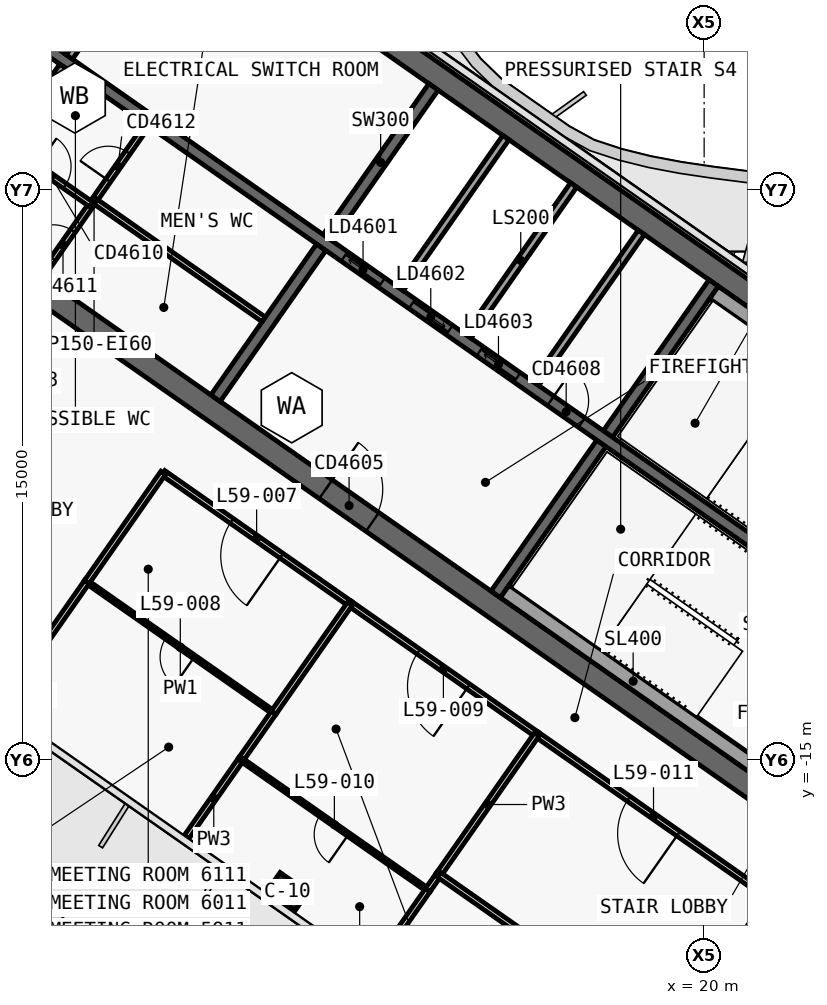
"""IFC4 building model, lengths in metres.
Left out: names, types, materials, properties, quantities, classifications, styles, units other than length and angle.
Written with IfcOpenShell. Run it as: python <this file> out.ifc"""

import sys

from ifc_helpers import new_model, si_unit, direction, frame, frame_2d, origin, origin_2d, place, context, subcontext, project, spatial, polyline, rectangle, outline, extrude, element, fill, save


model = new_model("IFC4")
c1 = context("Model", 3, precision=1e-05, world=origin(), true_north=direction((0.0, 1.0)))
c2 = subcontext(c1, "Body", "Model", "MODEL_VIEW")
j1 = project(units=[si_unit("LENGTHUNIT", "METRE"), si_unit("PLANEANGLEUNIT", "RADIAN")], contexts=[c1])
p1 = place(None, origin())
s1 = spatial("IfcSite", under=j1, at=p1, CompositionType="ELEMENT")
p2 = place(p1, origin())
s2 = spatial("IfcBuilding", under=s1, at=p2, CompositionType="ELEMENT")
p3 = place(p2, frame((0.0, 0.0, 252.7)))
s3 = spatial("IfcBuildingStorey", under=s2, at=p3, CompositionType="ELEMENT", Elevation=252.7)
p4 = place(p3, frame((0.028, 12.066, 0.0), z_axis=(0.0, 0.0, 1.0), x_axis=(0.819151382952, -0.573577380837, 0.0)))
e1 = element("IfcWall", 1, at=p4, inside=s3, PredefinedType="SHEAR", context=c2, shape_type="SweptSolid", body=[
    extrude(outline(polyline([(33.898, 0.3), (0.0, 0.3), (0.42, -0.3), (33.898, -0.3), (33.898, 0.3)])), origin(), (0.0, 0.0, 1.0), 3.9),
])
p5 = place(p3, frame((0.028, -0.874, 0.0), z_axis=(0.0, 0.0, 1.0), x_axis=(0.819150035022, -0.573579305871, 0.0)))
e2 = element("IfcWall", 2, at=p5, inside=s3, PredefinedType="SHEAR", context=c2, shape_type="SweptSolid", body=[
    extrude(outline(polyline([(26.476, 0.3), (0.0, 0.3), (0.42, -0.3), (26.476, -0.3), (26.476, 0.3)])), origin(), (0.0, 0.0, 1.0), 3.9),
])
p6 = place(p5, frame((0.826, 0.0, 0.0)))
e3 = element("IfcOpeningElement", 3, at=p6, cuts=e2, PredefinedType="OPENING", context=c2, shape_type="SweptSolid", body=[
    extrude(rectangle(XDim=1.5, YDim=2.1, at=frame_2d((0.75, 1.05))), frame((0.0, 0.31, 0.0), z_axis=(0.0, -1.0, 0.0), x_axis=(1.0, 0.0, 0.0)), (0.0, 0.0, 1.0), 0.62),
])
p7 = place(p5, frame((12.226, 0.0, 0.0)))
e4 = element("IfcOpeningElement", 4, at=p7, cuts=e2, PredefinedType="OPENING", context=c2, shape_type="SweptSolid", body=[
    extrude(rectangle(XDim=1.5, YDim=2.1, at=frame_2d((0.75, 1.05))), frame((0.0, 0.31, 0.0), z_axis=(0.0, -1.0, 0.0), x_axis=(1.0, 0.0, 0.0)), (0.0, 0.0, 1.0), 0.62),
])
p8 = place(p3, frame((7.143, -5.49, 0.0), z_axis=(0.0, 0.0, 1.0), x_axis=(0.573617744349, 0.819123118565, 0.0)))
e5 = element("IfcWall", 5, at=p8, inside=s3, PredefinedType="SHEAR", context=c2, shape_type="SweptSolid", body=[
    extrude(outline(polyline([(0.0, 0.15), (0.0, -0.15), (4.85, -0.15), (4.85, 0.15), (0.0, 0.15)])), origin(), (0.0, 0.0, 1.0), 3.9),
])
p9 = place(p3, frame((10.097, -1.271, 0.0), z_axis=(0.0, 0.0, 1.0), x_axis=(0.573560315113, 0.819163332265, 0.0)))
e6 = element("IfcWall", 6, at=p9, inside=s3, PredefinedType="SHEAR", context=c2, shape_type="SweptSolid", body=[
    extrude(outline(polyline([(4.85, -0.15), (4.85, 0.15), (0.0, 0.15), (0.0, -0.15), (4.85, -0.15)])), origin(), (0.0, 0.0, 1.0), 3.9),
])
p10 = place(p3, frame((14.515, -10.652, 0.0), z_axis=(0.0, 0.0, 1.0), x_axis=(0.573560315113, 0.819163332265, 0.0)))
e7 = element("IfcWall", 7, at=p10, inside=s3, PredefinedType="SHEAR", context=c2, shape_type="SweptSolid", body=[
    extrude(outline(polyline([(0.0, 0.15), (0.0, -0.15), (4.85, -0.15), (4.85, 0.15), (0.0, 0.15)])), origin(), (0.0, 0.0, 1.0), 3.9),
])
p11 = place(p3, frame((17.469, -6.433, 0.0), z_axis=(0.0, 0.0, 1.0), x_axis=(0.573594092424, 0.81913968109, 0.0)))
e8 = element("IfcWall", 8, at=p11, inside=s3, PredefinedType="SHEAR", context=c2, shape_type="SweptSolid", body=[
    extrude(outline(polyline([(4.85, -0.15), (4.85, 0.15), (0.0, 0.15), (0.0, -0.15), (4.85, -0.15)])), origin(), (0.0, 0.0, 1.0), 3.9),
])
p12 = place(p3, frame((2.638, 3.768, 0.0), z_axis=(0.0, 0.0, 1.0), x_axis=(0.819155014212, -0.573572194837, 0.0)))
e9 = element("IfcWall", 9, at=p12, inside=s3, PredefinedType="SHEAR", context=c2, shape_type="SweptSolid", body=[
    extrude(outline(polyline([(0.0, 0.15), (0.0, -0.15), (26.4, -0.15), (26.4, 0.15), (0.0, 0.15)])), origin(), (0.0, 0.0, 1.0), 3.9),
])
p13 = place(p12, frame((9.637, 0.0, 0.0)))
e10 = element("IfcOpeningElement", 10, at=p13, cuts=e9, PredefinedType="OPENING", context=c2, shape_type="SweptSolid", body=[
    extrude(rectangle(XDim=1.2, YDim=2.1, at=frame_2d((0.6, 1.05))), frame((0.0, 0.16, 0.0), z_axis=(0.0, -1.0, 0.0), x_axis=(1.0, 0.0, 0.0)), (0.0, 0.0, 1.0), 0.32),
])
p14 = place(p12, frame((11.812, 0.0, 0.0)))
e11 = element("IfcOpeningElement", 11, at=p14, cuts=e9, PredefinedType="OPENING", context=c2, shape_type="SweptSolid", body=[
    extrude(rectangle(XDim=1.2, YDim=2.1, at=frame_2d((0.6, 1.05))), frame((0.0, 0.16, 0.0), z_axis=(0.0, -1.0, 0.0), x_axis=(1.0, 0.0, 0.0)), (0.0, 0.0, 1.0), 0.32),
])
p15 = place(p12, frame((13.988, 0.0, 0.0)))
e12 = element("IfcOpeningElement", 12, at=p15, cuts=e9, PredefinedType="OPENING", context=c2, shape_type="SweptSolid", body=[
    extrude(rectangle(XDim=1.2, YDim=2.1, at=frame_2d((0.6, 1.05))), frame((0.0, 0.16, 0.0), z_axis=(0.0, -1.0, 0.0), x_axis=(1.0, 0.0, 0.0)), (0.0, 0.0, 1.0), 0.32),
])
p16 = place(p12, frame((16.262, 0.0, 0.0)))
e13 = element("IfcOpeningElement", 13, at=p16, cuts=e9, PredefinedType="OPENING", context=c2, shape_type="SweptSolid", body=[
    extrude(rectangle(XDim=1.0, YDim=2.1, at=frame_2d((0.5, 1.05))), frame((0.0, 0.16, 0.0), z_axis=(0.0, -1.0, 0.0), x_axis=(1.0, 0.0, 0.0)), (0.0, 0.0, 1.0), 0.32),
])
p17 = place(p3, frame((9.038, -18.475, 0.0), z_axis=(0.0, 0.0, 1.0), x_axis=(0.819152044289, -0.573576436351, 0.0)))
e14 = element("IfcColumn", 14, at=p17, inside=s3, PredefinedType="COLUMN", context=c2, shape_type="SweptSolid", body=[
    extrude(rectangle(XDim=0.9, YDim=0.6, at=origin_2d()), origin(), (0.0, 0.0, 1.0), 3.9),
])
p18 = place(p3, frame((12.001, -2.605, 0.0), z_axis=(0.0, 0.0, 1.0), x_axis=(0.573560315113, 0.819163332265, 0.0)))
e15 = element("IfcWall", 15, at=p18, inside=s3, PredefinedType="SOLIDWALL", context=c2, shape_type="SweptSolid", body=[
    extrude(rectangle(XDim=4.85, YDim=0.2, at=frame_2d((2.425, 0.0))), origin(), (0.0, 0.0, 1.0), 3.9),
])
p19 = place(p3, frame((13.783, -3.852, 0.0), z_axis=(0.0, 0.0, 1.0), x_axis=(0.573594092424, 0.81913968109, 0.0)))
e16 = element("IfcWall", 16, at=p19, inside=s3, PredefinedType="SOLIDWALL", context=c2, shape_type="SweptSolid", body=[
    extrude(rectangle(XDim=4.85, YDim=0.2, at=frame_2d((2.425, 0.0))), origin(), (0.0, 0.0, 1.0), 3.9),
])
p20 = place(p3, frame((15.565, -5.1, 0.0), z_axis=(0.0, 0.0, 1.0), x_axis=(0.573560315113, 0.819163332265, 0.0)))
e17 = element("IfcWall", 17, at=p20, inside=s3, PredefinedType="SOLIDWALL", context=c2, shape_type="SweptSolid", body=[
    extrude(rectangle(XDim=4.85, YDim=0.2, at=frame_2d((2.425, 0.0))), origin(), (0.0, 0.0, 1.0), 3.9),
])
p21 = place(p3, frame((2.556, -2.278, 0.0), z_axis=(0.0, 0.0, 1.0), x_axis=(0.573560315113, 0.819163332265, 0.0)))
e18 = element("IfcWall", 18, at=p21, inside=s3, PredefinedType="PARTITIONING", context=c2, shape_type="SweptSolid", body=[
    extrude(rectangle(XDim=4.85, YDim=0.15, at=frame_2d((2.425, 0.0))), origin(), (0.0, 0.0, 1.0), 3.62),
])
p22 = place(p21, frame((0.55, 0.0, 0.0)))
e19 = element("IfcOpeningElement", 19, at=p22, cuts=e18, PredefinedType="OPENING", context=c2, shape_type="SweptSolid", body=[
    extrude(rectangle(XDim=0.9, YDim=2.1, at=frame_2d((0.45, 1.05))), frame((0.0, 0.085, 0.0), z_axis=(0.0, -1.0, 0.0), x_axis=(1.0, 0.0, 0.0)), (0.0, 0.0, 1.0), 0.17),
])
p23 = place(p21, frame((3.075, 0.0, 0.0)))
e20 = element("IfcOpeningElement", 20, at=p23, cuts=e18, PredefinedType="OPENING", context=c2, shape_type="SweptSolid", body=[
    extrude(rectangle(XDim=0.9, YDim=2.1, at=frame_2d((0.45, 1.05))), frame((0.0, 0.085, 0.0), z_axis=(0.0, -1.0, 0.0), x_axis=(1.0, 0.0, 0.0)), (0.0, 0.0, 1.0), 0.17),
])
p24 = place(p3, frame((1.745, 1.097, 0.0), z_axis=(0.0, 0.0, 1.0), x_axis=(0.819178980414, -0.573537965655, 0.0)))
e21 = element("IfcWall", 21, at=p24, inside=s3, PredefinedType="PARTITIONING", context=c2, shape_type="SweptSolid", body=[
    extrude(rectangle(XDim=2.6, YDim=0.15, at=frame_2d((1.3, 0.0))), origin(), (0.0, 0.0, 1.0), 3.62),
])
p25 = place(p24, frame((0.85, 0.0, 0.0)))
e22 = element("IfcOpeningElement", 22, at=p25, cuts=e21, PredefinedType="OPENING", context=c2, shape_type="SweptSolid", body=[
    extrude(rectangle(XDim=0.9, YDim=2.1, at=frame_2d((0.45, 1.05))), frame((0.0, 0.085, 0.0), z_axis=(0.0, -1.0, 0.0), x_axis=(1.0, 0.0, 0.0)), (0.0, 0.0, 1.0), 0.17),
])
p26 = place(p3, frame((3.947, -0.292, 0.0), z_axis=(0.0, 0.0, 1.0), x_axis=(0.819151939971, -0.573576585332, 0.0)))
e23 = element("IfcWall", 23, at=p26, inside=s3, PredefinedType="PARTITIONING", context=c2, shape_type="SweptSolid", body=[
    extrude(rectangle(XDim=5.45, YDim=0.15, at=frame_2d((2.725, 0.0))), origin(), (0.0, 0.0, 1.0), 3.62),
])
p27 = place(p3, frame((20.259, -2.71, 0.0), z_axis=(0.0, 0.0, 1.0), x_axis=(0.81914849389, -0.573581506813, 0.0)))
e24 = element("IfcWall", 24, at=p27, inside=s3, PredefinedType="SOLIDWALL", context=c2, shape_type="SweptSolid", body=[
    extrude(rectangle(XDim=8.25, YDim=0.4, at=frame_2d((4.125, 0.0))), origin(), (0.0, 0.0, 1.0), 3.62),
])
p28 = place(p3, frame((14.753, -10.574, 0.0), z_axis=(0.0, 0.0, 1.0), x_axis=(0.819158229677, -0.573567602601, 0.0)))
e25 = element("IfcWall", 25, at=p28, inside=s3, PredefinedType="SOLIDWALL", context=c2, shape_type="SweptSolid", body=[
    extrude(rectangle(XDim=8.25, YDim=0.4, at=frame_2d((4.125, 0.0))), origin(), (0.0, 0.0, 1.0), 3.62),
])
p29 = place(p3, frame((0.344, -0.729, 0.0), z_axis=(0.0, 0.0, 1.0), x_axis=(0.573560315113, 0.819163332265, 0.0)))
e26 = element("IfcWall", 26, at=p29, inside=s3, PredefinedType="SOLIDWALL", context=c2, shape_type="SweptSolid", body=[
    extrude(rectangle(XDim=4.85, YDim=0.2, at=frame_2d((2.425, 0.0))), origin(), (0.0, 0.0, 1.0), 3.62),
])
p30 = place(p29, frame((0.55, 0.0, 0.0)))
e27 = element("IfcOpeningElement", 27, at=p30, cuts=e26, PredefinedType="OPENING", context=c2, shape_type="SweptSolid", body=[
    extrude(rectangle(XDim=0.9, YDim=2.1, at=frame_2d((0.45, 1.05))), frame((0.0, 0.11, 0.0), z_axis=(0.0, -1.0, 0.0), x_axis=(1.0, 0.0, 0.0)), (0.0, 0.0, 1.0), 0.22),
])
p31 = place(p3, frame((3.298, 3.49, 0.0), z_axis=(0.0, 0.0, 1.0), x_axis=(0.573560315113, 0.819163332265, 0.0)))
e28 = element("IfcWall", 28, at=p31, inside=s3, PredefinedType="SOLIDWALL", context=c2, shape_type="SweptSolid", body=[
    extrude(rectangle(XDim=4.85, YDim=0.2, at=frame_2d((2.425, 0.0))), origin(), (0.0, 0.0, 1.0), 3.62),
])
p32 = place(p31, frame((0.7, 0.0, 0.0)))
e29 = element("IfcOpeningElement", 29, at=p32, cuts=e28, PredefinedType="OPENING", context=c2, shape_type="SweptSolid", body=[
    extrude(rectangle(XDim=1.0, YDim=2.1, at=frame_2d((0.5, 1.05))), frame((0.0, 0.11, 0.0), z_axis=(0.0, -1.0, 0.0), x_axis=(1.0, 0.0, 0.0)), (0.0, 0.0, 1.0), 0.22),
])
p33 = place(p3, frame((10.683, -10.898, 0.0), z_axis=(0.0, 0.0, 1.0), x_axis=(-0.819147828287, 0.573582457378, 0.0)))
e30 = element("IfcWall", 30, at=p33, inside=s3, PredefinedType="PARTITIONING", context=c2, shape_type="SweptSolid", body=[
    extrude(rectangle(XDim=6.002, YDim=0.15, at=frame_2d((3.001, 0.0))), origin(), (0.0, 0.0, 1.0), 3.05),
])
p34 = place(p33, frame((2.201, 0.0, 0.0)))
e31 = element("IfcOpeningElement", 31, at=p34, cuts=e30, PredefinedType="OPENING", context=c2, shape_type="SweptSolid", body=[
    extrude(rectangle(XDim=1.6, YDim=2.1, at=frame_2d((0.8, 1.05))), frame((0.0, 0.085, 0.0), z_axis=(0.0, -1.0, 0.0), x_axis=(1.0, 0.0, 0.0)), (0.0, 0.0, 1.0), 0.17),
])
p35 = place(p3, frame((15.598, -14.34, 0.0), z_axis=(0.0, 0.0, 1.0), x_axis=(-0.819145946981, 0.573585144111, 0.0)))
e32 = element("IfcWall", 32, at=p35, inside=s3, PredefinedType="PARTITIONING", context=c2, shape_type="SweptSolid", body=[
    extrude(rectangle(XDim=6.004, YDim=0.15, at=frame_2d((3.002, 0.0))), origin(), (0.0, 0.0, 1.0), 3.05),
])
p36 = place(p35, frame((2.202, 0.0, 0.0)))
e33 = element("IfcOpeningElement", 33, at=p36, cuts=e32, PredefinedType="OPENING", context=c2, shape_type="SweptSolid", body=[
    extrude(rectangle(XDim=1.6, YDim=2.1, at=frame_2d((0.8, 1.05))), frame((0.0, 0.085, 0.0), z_axis=(0.0, -1.0, 0.0), x_axis=(1.0, 0.0, 0.0)), (0.0, 0.0, 1.0), 0.17),
])
p37 = place(p3, frame((21.741, -18.642, 0.0), z_axis=(0.0, 0.0, 1.0), x_axis=(-0.819164661457, 0.573558416746, 0.0)))
e34 = element("IfcWall", 34, at=p37, inside=s3, PredefinedType="PARTITIONING", context=c2, shape_type="SweptSolid", body=[
    extrude(rectangle(XDim=7.504, YDim=0.15, at=frame_2d((3.752, 0.0))), origin(), (0.0, 0.0, 1.0), 3.05),
])
p38 = place(p37, frame((2.952, 0.0, 0.0)))
e35 = element("IfcOpeningElement", 35, at=p38, cuts=e34, PredefinedType="OPENING", context=c2, shape_type="SweptSolid", body=[
    extrude(rectangle(XDim=1.6, YDim=2.1, at=frame_2d((0.8, 1.05))), frame((0.0, 0.085, 0.0), z_axis=(0.0, -1.0, 0.0), x_axis=(1.0, 0.0, 0.0)), (0.0, 0.0, 1.0), 0.17),
])
p39 = place(p3, frame((8.673, -13.765, 0.0), z_axis=(0.0, 0.0, 1.0), x_axis=(-0.819149710902, 0.573579768758, 0.0)))
e36 = element("IfcWall", 36, at=p39, inside=s3, PredefinedType="PARTITIONING", context=c2, shape_type="SweptSolid", body=[
    extrude(rectangle(XDim=6.0, YDim=0.1, at=frame_2d((3.0, 0.0))), origin(), (0.0, 0.0, 1.0), 3.05),
])
p40 = place(p39, frame((2.55, 0.0, 0.0)))
e37 = element("IfcOpeningElement", 37, at=p40, cuts=e36, PredefinedType="OPENING", context=c2, shape_type="SweptSolid", body=[
    extrude(rectangle(XDim=0.9, YDim=2.1, at=frame_2d((0.45, 1.05))), frame((0.0, 0.06, 0.0), z_axis=(0.0, -1.0, 0.0), x_axis=(1.0, 0.0, 0.0)), (0.0, 0.0, 1.0), 0.12),
])
p41 = place(p3, frame((7.814, -14.992, 0.0), z_axis=(0.0, 0.0, 1.0), x_axis=(-0.57356715775, -0.819158541157, 0.0)))
e38 = element("IfcWall", 38, at=p41, inside=s3, PredefinedType="PARTITIONING", context=c2, shape_type="SweptSolid", body=[
    extrude(rectangle(XDim=2.501, YDim=0.15, at=frame_2d((1.25, 0.0))), origin(), (0.0, 0.0, 1.0), 3.0),
])
p42 = place(p3, frame((8.673, -13.765, 0.0), z_axis=(0.0, 0.0, 1.0), x_axis=(-0.573549676934, -0.819170780783, 0.0)))
e39 = element("IfcWall", 39, at=p42, inside=s3, PredefinedType="PARTITIONING", context=c2, shape_type="SweptSolid", body=[
    extrude(rectangle(XDim=1.501, YDim=0.15, at=frame_2d((0.75, 0.0))), origin(), (0.0, 0.0, 1.0), 3.62),
])
p43 = place(p3, frame((1.849, -13.051, 0.0), z_axis=(0.0, 0.0, 1.0), x_axis=(0.573595235521, 0.819138880647, 0.0)))
e40 = element("IfcWall", 40, at=p43, inside=s3, PredefinedType="PARTITIONING", context=c2, shape_type="SweptSolid", body=[
    extrude(rectangle(XDim=3.329, YDim=0.15, at=frame_2d((1.665, 0.0))), origin(), (0.0, 0.0, 1.0), 3.05),
])
p44 = place(p3, frame((10.681, -10.897, 0.0), z_axis=(0.0, 0.0, 1.0), x_axis=(-0.573612130335, -0.819127049933, 0.0)))
e41 = element("IfcWall", 41, at=p44, inside=s3, PredefinedType="PARTITIONING", context=c2, shape_type="SweptSolid", body=[
    extrude(rectangle(XDim=3.5, YDim=0.15, at=frame_2d((1.75, 0.0))), origin(), (0.0, 0.0, 1.0), 3.62),
])
p45 = place(p3, frame((3.759, -10.323, 0.0), z_axis=(0.0, 0.0, 1.0), x_axis=(0.573598101901, 0.81913687348, 0.0)))
e42 = element("IfcWall", 42, at=p45, inside=s3, PredefinedType="PARTITIONING", context=c2, shape_type="SweptSolid", body=[
    extrude(rectangle(XDim=3.5, YDim=0.15, at=frame_2d((1.75, 0.0))), origin(), (0.0, 0.0, 1.0), 3.05),
])
p46 = place(p3, frame((12.728, -18.435, 0.0), z_axis=(0.0, 0.0, 1.0), x_axis=(-0.819163097304, 0.573560650686, 0.0)))
e43 = element("IfcWall", 43, at=p46, inside=s3, PredefinedType="PARTITIONING", context=c2, shape_type="SweptSolid", body=[
    extrude(rectangle(XDim=6.0, YDim=0.1, at=frame_2d((3.0, 0.0))), origin(), (0.0, 0.0, 1.0), 3.05),
])
p47 = place(p46, frame((2.55, 0.0, 0.0)))
e44 = element("IfcOpeningElement", 44, at=p47, cuts=e43, PredefinedType="OPENING", context=c2, shape_type="SweptSolid", body=[
    extrude(rectangle(XDim=0.9, YDim=2.1, at=frame_2d((0.45, 1.05))), frame((0.0, 0.06, 0.0), z_axis=(0.0, -1.0, 0.0), x_axis=(1.0, 0.0, 0.0)), (0.0, 0.0, 1.0), 0.12),
])
p48 = place(p3, frame((12.728, -18.435, 0.0), z_axis=(0.0, 0.0, 1.0), x_axis=(-0.573560689761, -0.819163069945, 0.0)))
e45 = element("IfcWall", 45, at=p48, inside=s3, PredefinedType="PARTITIONING", context=c2, shape_type="SweptSolid", body=[
    extrude(rectangle(XDim=2.499, YDim=0.15, at=frame_2d((1.25, 0.0))), origin(), (0.0, 0.0, 1.0), 3.0),
])
p49 = place(p3, frame((15.596, -14.339, 0.0), z_axis=(0.0, 0.0, 1.0), x_axis=(-0.573564243949, -0.819160581365, 0.0)))
e46 = element("IfcWall", 46, at=p49, inside=s3, PredefinedType="PARTITIONING", context=c2, shape_type="SweptSolid", body=[
    extrude(rectangle(XDim=4.502, YDim=0.15, at=frame_2d((2.251, 0.0))), origin(), (0.0, 0.0, 1.0), 3.62),
])
p50 = place(p3, frame((13.016, -18.024, 0.0), z_axis=(0.0, 0.0, 1.0), x_axis=(-0.573560455774, -0.819163233777, 0.0)))
e47 = element("IfcWall", 47, at=p50, inside=s3, PredefinedType="PARTITIONING", context=c2, shape_type="SweptSolid", body=[
    extrude(rectangle(XDim=0.501, YDim=0.15, at=frame_2d((0.25, 0.0))), origin(), (0.0, 0.0, 1.0), 3.62),
])
p51 = place(p3, frame((19.159, -22.327, 0.0), z_axis=(0.0, 0.0, 1.0), x_axis=(-0.81915238829, 0.573575945067, 0.0)))
e48 = element("IfcWall", 48, at=p51, inside=s3, PredefinedType="PARTITIONING", context=c2, shape_type="SweptSolid", body=[
    extrude(rectangle(XDim=7.5, YDim=0.15, at=frame_2d((3.75, 0.0))), origin(), (0.0, 0.0, 1.0), 3.05),
])
p52 = place(p3, frame((21.74, -18.641, 0.0), z_axis=(0.0, 0.0, 1.0), x_axis=(-0.573555919535, -0.819166409935, 0.0)))
e49 = element("IfcWall", 49, at=p52, inside=s3, PredefinedType="PARTITIONING", context=c2, shape_type="SweptSolid", body=[
    extrude(rectangle(XDim=3.502, YDim=0.15, at=frame_2d((1.751, 0.0))), origin(), (0.0, 0.0, 1.0), 3.05),
])
p53 = place(p13, origin())
e50 = element("IfcDoor", 50, at=p53, inside=s3, OperationType="SLIDING_TO_LEFT", PredefinedType="DOOR", context=c2, shape_type="SweptSolid", body=[
    extrude(rectangle(XDim=1.2, YDim=2.1, at=frame_2d((0.6, 1.05))), frame((0.0, 0.025, 0.0), z_axis=(0.0, -1.0, 0.0), x_axis=(1.0, 0.0, 0.0)), (0.0, 0.0, 1.0), 0.05),
])
fill(e10, e50)
p54 = place(p14, origin())
e51 = element("IfcDoor", 51, at=p54, inside=s3, OperationType="SLIDING_TO_RIGHT", PredefinedType="DOOR", context=c2, shape_type="SweptSolid", body=[
    extrude(rectangle(XDim=1.2, YDim=2.1, at=frame_2d((0.6, 1.05))), frame((0.0, 0.025, 0.0), z_axis=(0.0, -1.0, 0.0), x_axis=(1.0, 0.0, 0.0)), (0.0, 0.0, 1.0), 0.05),
])
fill(e11, e51)
p55 = place(p15, origin())
e52 = element("IfcDoor", 52, at=p55, inside=s3, OperationType="SLIDING_TO_LEFT", PredefinedType="DOOR", context=c2, shape_type="SweptSolid", body=[
    extrude(rectangle(XDim=1.2, YDim=2.1, at=frame_2d((0.6, 1.05))), frame((0.0, 0.025, 0.0), z_axis=(0.0, -1.0, 0.0), x_axis=(1.0, 0.0, 0.0)), (0.0, 0.0, 1.0), 0.05),
])
fill(e12, e52)
p56 = place(p16, origin())
e53 = element("IfcDoor", 53, at=p56, inside=s3, OperationType="SINGLE_SWING_RIGHT", PredefinedType="DOOR", context=c2, shape_type="SweptSolid", body=[
    extrude(rectangle(XDim=1.0, YDim=2.1, at=frame_2d((0.5, 1.05))), frame((0.0, 0.025, 0.0), z_axis=(0.0, -1.0, 0.0), x_axis=(1.0, 0.0, 0.0)), (0.0, 0.0, 1.0), 0.05),
])
fill(e13, e53)
p57 = place(p22, origin())
e54 = element("IfcDoor", 54, at=p57, inside=s3, OperationType="SINGLE_SWING_RIGHT", PredefinedType="DOOR", context=c2, shape_type="SweptSolid", body=[
    extrude(rectangle(XDim=0.9, YDim=2.1, at=frame_2d((0.45, 1.05))), frame((0.0, 0.025, 0.0), z_axis=(0.0, -1.0, 0.0), x_axis=(1.0, 0.0, 0.0)), (0.0, 0.0, 1.0), 0.05),
])
fill(e19, e54)
p58 = place(p25, origin())
e55 = element("IfcDoor", 55, at=p58, inside=s3, OperationType="SINGLE_SWING_RIGHT", PredefinedType="DOOR", context=c2, shape_type="SweptSolid", body=[
    extrude(rectangle(XDim=0.9, YDim=2.1, at=frame_2d((0.45, 1.05))), frame((0.0, 0.025, 0.0), z_axis=(0.0, -1.0, 0.0), x_axis=(1.0, 0.0, 0.0)), (0.0, 0.0, 1.0), 0.05),
])
fill(e22, e55)
p59 = place(p23, origin())
e56 = element("IfcDoor", 56, at=p59, inside=s3, OperationType="SINGLE_SWING_RIGHT", PredefinedType="DOOR", context=c2, shape_type="SweptSolid", body=[
    extrude(rectangle(XDim=0.9, YDim=2.1, at=frame_2d((0.45, 1.05))), frame((0.0, 0.025, 0.0), z_axis=(0.0, -1.0, 0.0), x_axis=(1.0, 0.0, 0.0)), (0.0, 0.0, 1.0), 0.05),
])
fill(e20, e56)
p60 = place(p7, origin())
e57 = element("IfcDoor", 57, at=p60, inside=s3, OperationType="DOUBLE_DOOR_SINGLE_SWING", PredefinedType="DOOR", context=c2, shape_type="SweptSolid", body=[
    extrude(rectangle(XDim=1.5, YDim=2.1, at=frame_2d((0.75, 1.05))), frame((0.0, 0.025, 0.0), z_axis=(0.0, -1.0, 0.0), x_axis=(1.0, 0.0, 0.0)), (0.0, 0.0, 1.0), 0.05),
])
fill(e4, e57)
p61 = place(p34, origin())
e58 = element("IfcDoor", 58, at=p61, inside=s3, OperationType="DOUBLE_DOOR_SINGLE_SWING", PredefinedType="DOOR", context=c2, shape_type="SweptSolid", body=[
    extrude(rectangle(XDim=1.6, YDim=2.1, at=frame_2d((0.8, 1.05))), frame((0.0, 0.025, 0.0), z_axis=(0.0, -1.0, 0.0), x_axis=(1.0, 0.0, 0.0)), (0.0, 0.0, 1.0), 0.05),
])
fill(e31, e58)
p62 = place(p40, origin())
e59 = element("IfcDoor", 59, at=p62, inside=s3, OperationType="SINGLE_SWING_RIGHT", PredefinedType="DOOR", context=c2, shape_type="SweptSolid", body=[
    extrude(rectangle(XDim=0.9, YDim=2.1, at=frame_2d((0.45, 1.05))), frame((0.0, 0.025, 0.0), z_axis=(0.0, -1.0, 0.0), x_axis=(1.0, 0.0, 0.0)), (0.0, 0.0, 1.0), 0.05),
])
fill(e37, e59)
p63 = place(p36, origin())
e60 = element("IfcDoor", 60, at=p63, inside=s3, OperationType="DOUBLE_DOOR_SINGLE_SWING", PredefinedType="DOOR", context=c2, shape_type="SweptSolid", body=[
    extrude(rectangle(XDim=1.6, YDim=2.1, at=frame_2d((0.8, 1.05))), frame((0.0, 0.025, 0.0), z_axis=(0.0, -1.0, 0.0), x_axis=(1.0, 0.0, 0.0)), (0.0, 0.0, 1.0), 0.05),
])
fill(e33, e60)
p64 = place(p47, origin())
e61 = element("IfcDoor", 61, at=p64, inside=s3, OperationType="SINGLE_SWING_RIGHT", PredefinedType="DOOR", context=c2, shape_type="SweptSolid", body=[
    extrude(rectangle(XDim=0.9, YDim=2.1, at=frame_2d((0.45, 1.05))), frame((0.0, 0.025, 0.0), z_axis=(0.0, -1.0, 0.0), x_axis=(1.0, 0.0, 0.0)), (0.0, 0.0, 1.0), 0.05),
])
fill(e44, e61)
p65 = place(p38, origin())
e62 = element("IfcDoor", 62, at=p65, inside=s3, OperationType="DOUBLE_DOOR_SINGLE_SWING", PredefinedType="DOOR", context=c2, shape_type="SweptSolid", body=[
    extrude(rectangle(XDim=1.6, YDim=2.1, at=frame_2d((0.8, 1.05))), frame((0.0, 0.025, 0.0), z_axis=(0.0, -1.0, 0.0), x_axis=(1.0, 0.0, 0.0)), (0.0, 0.0, 1.0), 0.05),
])
fill(e35, e62)
save(model, sys.argv[1])
